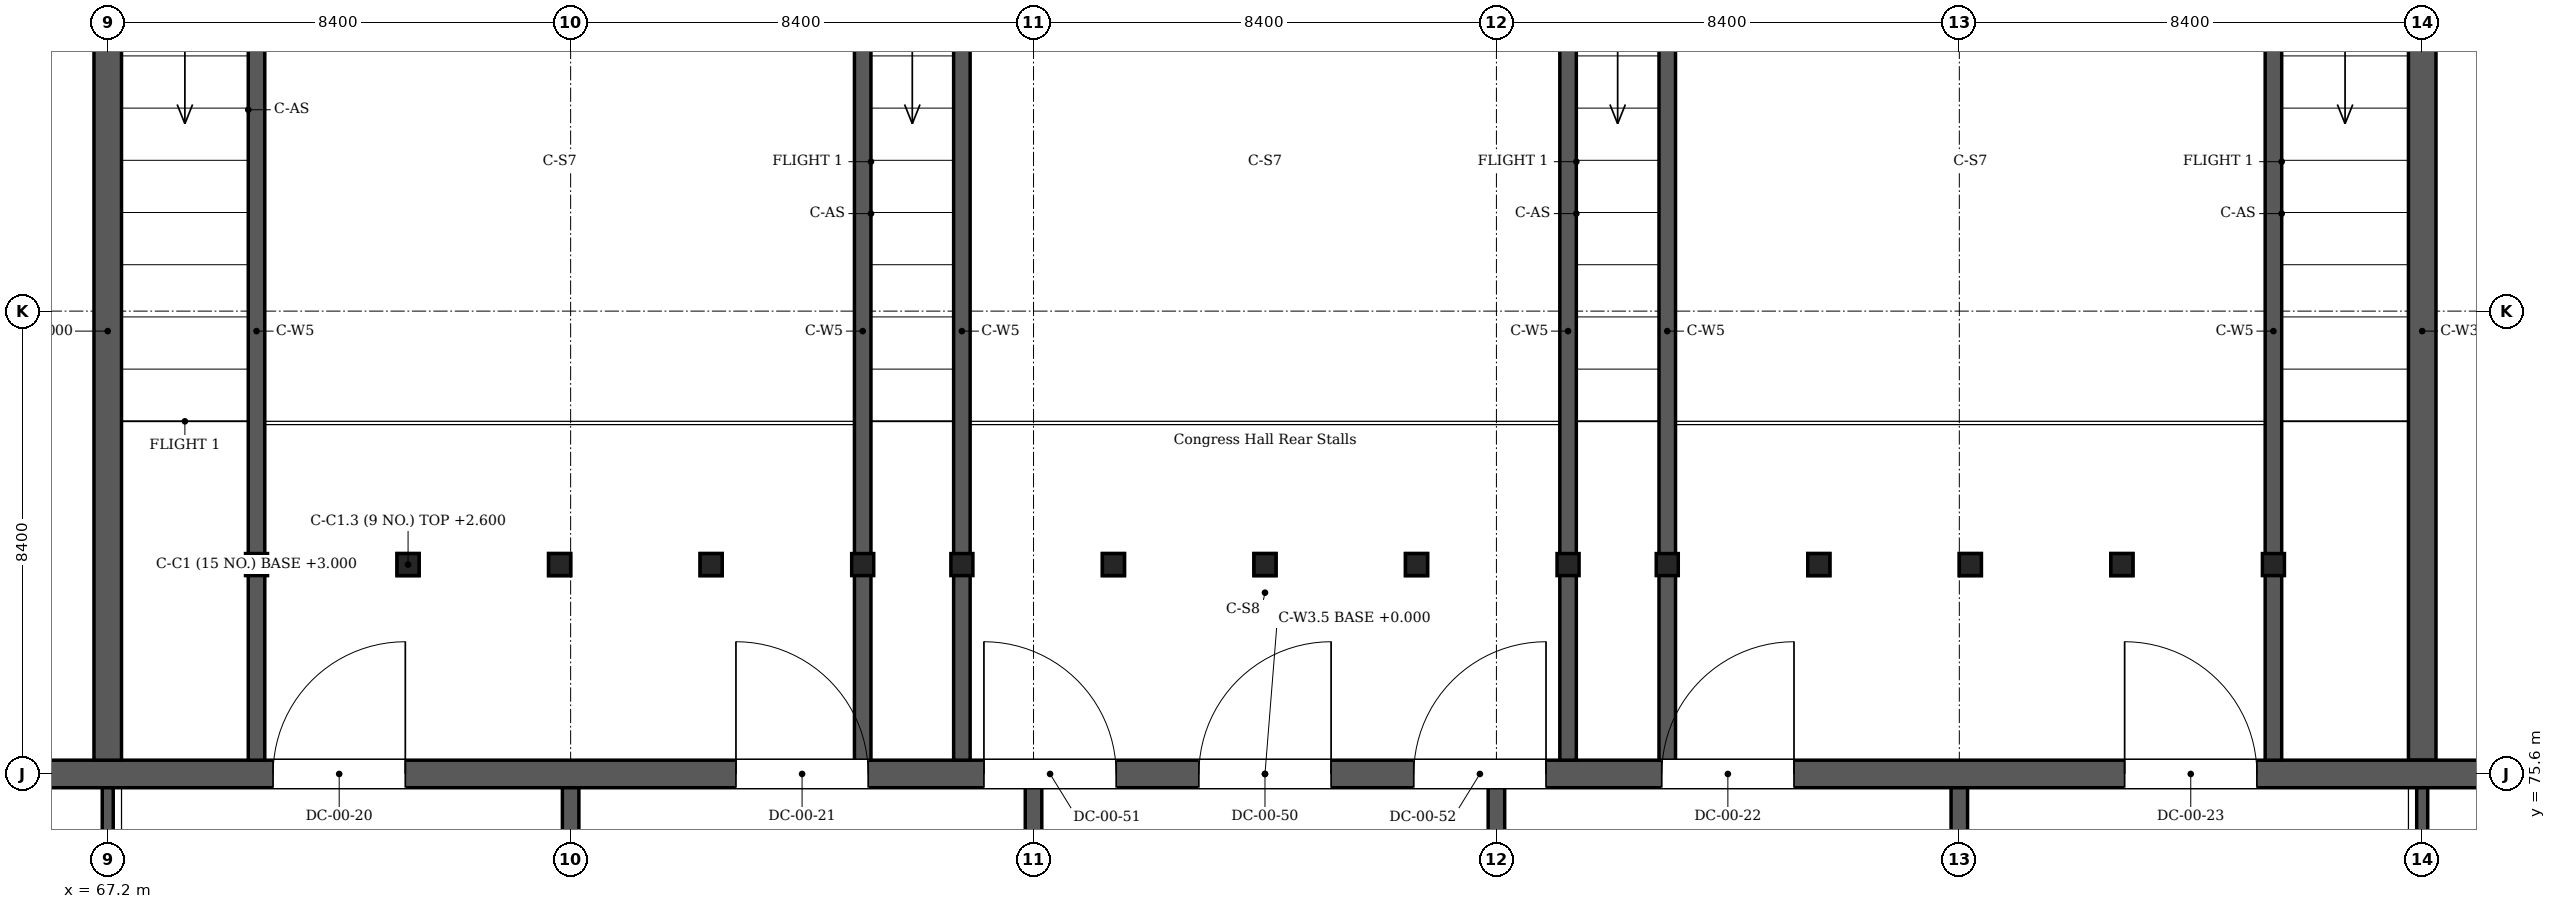
"""IFC4 building model, lengths in metres.
Left out: names, types, materials, properties, quantities, classifications, styles, units other than length and angle.
Written with IfcOpenShell. Run it as: python <this file> out.ifc"""

import sys

from ifc_helpers import new_model, si_unit, direction, frame, frame_2d, origin, origin_2d, place, context, subcontext, project, spatial, polyline, rectangle, i_section, outline, extrude, element, fill, save


model = new_model("IFC4")
c1 = context("Model", 3, precision=1e-05, world=origin(), true_north=direction((0.0, 1.0)))
c2 = subcontext(c1, "Body", "Model", "MODEL_VIEW")
j1 = project(units=[si_unit("LENGTHUNIT", "METRE"), si_unit("PLANEANGLEUNIT", "RADIAN")], contexts=[c1])
p1 = place(None, origin())
s1 = spatial("IfcSite", under=j1, at=p1, CompositionType="ELEMENT")
p2 = place(p1, origin())
s2 = spatial("IfcBuilding", under=s1, at=p2, CompositionType="ELEMENT")
p3 = place(p2, origin())
s3 = spatial("IfcBuildingStorey", under=s2, at=p3, CompositionType="ELEMENT", Elevation=0.0)
p4 = place(p3, frame((59.25, 75.6, 0.0), z_axis=(0.0, 0.0, 1.0), x_axis=(1.0, 0.0, 0.0)))
e1 = element("IfcWall", 1, at=p4, inside=s3, PredefinedType="SOLIDWALL", context=c2, shape_type="SweptSolid", body=[
    extrude(rectangle(XDim=57.9, YDim=0.5, at=frame_2d((28.95, 0.0))), origin(), (0.0, 0.0, 1.0), 6.0),
])
p5 = place(p4, frame((1.85, 0.0, 0.0)))
e2 = element("IfcOpeningElement", 2, at=p5, cuts=e1, PredefinedType="OPENING", context=c2, shape_type="SweptSolid", body=[
    extrude(rectangle(XDim=1.8, YDim=2.1, at=frame_2d((0.9, 1.05))), frame((0.0, 0.26, 0.0), z_axis=(0.0, -1.0, 0.0), x_axis=(1.0, 0.0, 0.0)), (0.0, 0.0, 1.0), 0.52),
])
p6 = place(p4, frame((53.25, 0.0, 0.0)))
e3 = element("IfcOpeningElement", 3, at=p6, cuts=e1, PredefinedType="OPENING", context=c2, shape_type="SweptSolid", body=[
    extrude(rectangle(XDim=1.8, YDim=2.1, at=frame_2d((0.9, 1.05))), frame((0.0, 0.26, 0.0), z_axis=(0.0, -1.0, 0.0), x_axis=(1.0, 0.0, 0.0)), (0.0, 0.0, 1.0), 0.52),
])
p7 = place(p4, frame((10.95, 0.0, 3.0)))
e4 = element("IfcOpeningElement", 4, at=p7, cuts=e1, PredefinedType="OPENING", context=c2, shape_type="SweptSolid", body=[
    extrude(rectangle(XDim=2.4, YDim=2.1, at=frame_2d((1.2, 1.05))), frame((0.0, 0.26, 0.0), z_axis=(0.0, -1.0, 0.0), x_axis=(1.0, 0.0, 0.0)), (0.0, 0.0, 1.0), 0.52),
])
p8 = place(p4, frame((19.35, 0.0, 3.0)))
e5 = element("IfcOpeningElement", 5, at=p8, cuts=e1, PredefinedType="OPENING", context=c2, shape_type="SweptSolid", body=[
    extrude(rectangle(XDim=2.4, YDim=2.1, at=frame_2d((1.2, 1.05))), frame((0.0, 0.26, 0.0), z_axis=(0.0, -1.0, 0.0), x_axis=(1.0, 0.0, 0.0)), (0.0, 0.0, 1.0), 0.52),
])
p9 = place(p4, frame((36.15, 0.0, 3.0)))
e6 = element("IfcOpeningElement", 6, at=p9, cuts=e1, PredefinedType="OPENING", context=c2, shape_type="SweptSolid", body=[
    extrude(rectangle(XDim=2.4, YDim=2.1, at=frame_2d((1.2, 1.05))), frame((0.0, 0.26, 0.0), z_axis=(0.0, -1.0, 0.0), x_axis=(1.0, 0.0, 0.0)), (0.0, 0.0, 1.0), 0.52),
])
p10 = place(p4, frame((44.55, 0.0, 3.0)))
e7 = element("IfcOpeningElement", 7, at=p10, cuts=e1, PredefinedType="OPENING", context=c2, shape_type="SweptSolid", body=[
    extrude(rectangle(XDim=2.4, YDim=2.1, at=frame_2d((1.2, 1.05))), frame((0.0, 0.26, 0.0), z_axis=(0.0, -1.0, 0.0), x_axis=(1.0, 0.0, 0.0)), (0.0, 0.0, 1.0), 0.52),
])
p11 = place(p4, frame((27.75, 0.0, 3.0)))
e8 = element("IfcOpeningElement", 8, at=p11, cuts=e1, PredefinedType="OPENING", context=c2, shape_type="SweptSolid", body=[
    extrude(rectangle(XDim=2.4, YDim=2.1, at=frame_2d((1.2, 1.05))), frame((0.0, 0.26, 0.0), z_axis=(0.0, -1.0, 0.0), x_axis=(1.0, 0.0, 0.0)), (0.0, 0.0, 1.0), 0.52),
])
p12 = place(p4, frame((23.85, 0.0, 3.0)))
e9 = element("IfcOpeningElement", 9, at=p12, cuts=e1, PredefinedType="OPENING", context=c2, shape_type="SweptSolid", body=[
    extrude(rectangle(XDim=2.4, YDim=2.1, at=frame_2d((1.2, 1.05))), frame((0.0, 0.26, 0.0), z_axis=(0.0, -1.0, 0.0), x_axis=(1.0, 0.0, 0.0)), (0.0, 0.0, 1.0), 0.52),
])
p13 = place(p4, frame((31.65, 0.0, 3.0)))
e10 = element("IfcOpeningElement", 10, at=p13, cuts=e1, PredefinedType="OPENING", context=c2, shape_type="SweptSolid", body=[
    extrude(rectangle(XDim=2.4, YDim=2.1, at=frame_2d((1.2, 1.05))), frame((0.0, 0.26, 0.0), z_axis=(0.0, -1.0, 0.0), x_axis=(1.0, 0.0, 0.0)), (0.0, 0.0, 1.0), 0.52),
])
p14 = place(p3, frame((67.2, 75.85, 0.0), z_axis=(0.0, 0.0, 1.0), x_axis=(0.0, 1.0, 0.0)))
e11 = element("IfcWall", 11, at=p14, inside=s3, PredefinedType="SOLIDWALL", context=c2, shape_type="SweptSolid", body=[
    extrude(rectangle(XDim=41.5, YDim=0.5, at=frame_2d((20.75, 0.0))), origin(), (0.0, 0.0, 1.0), 6.0),
])
p15 = place(p14, frame((24.55, 0.0, 0.0)))
e12 = element("IfcOpeningElement", 12, at=p15, cuts=e11, PredefinedType="OPENING", context=c2, shape_type="SweptSolid", body=[
    extrude(rectangle(XDim=2.0, YDim=2.4, at=frame_2d((1.0, 1.2))), frame((0.0, 0.26, 0.0), z_axis=(0.0, -1.0, 0.0), x_axis=(1.0, 0.0, 0.0)), (0.0, 0.0, 1.0), 0.52),
])
p16 = place(p3, frame((109.2, 117.35, 0.0), z_axis=(0.0, 0.0, 1.0), x_axis=(0.0, -1.0, 0.0)))
e13 = element("IfcWall", 13, at=p16, inside=s3, PredefinedType="SOLIDWALL", context=c2, shape_type="SweptSolid", body=[
    extrude(rectangle(XDim=41.5, YDim=0.5, at=frame_2d((20.75, 0.0))), origin(), (0.0, 0.0, 1.0), 6.0),
])
p17 = place(p16, frame((14.95, 0.0, 0.0)))
e14 = element("IfcOpeningElement", 14, at=p17, cuts=e13, PredefinedType="OPENING", context=c2, shape_type="SweptSolid", body=[
    extrude(rectangle(XDim=2.0, YDim=2.4, at=frame_2d((1.0, 1.2))), frame((0.0, 0.26, 0.0), z_axis=(0.0, -1.0, 0.0), x_axis=(1.0, 0.0, 0.0)), (0.0, 0.0, 1.0), 0.52),
])
for number, where, z_axis, x_axis in (
    (15, (69.9, 95.767, 0.0), (0.0, 0.0, 1.0), (0.0, -1.0, 0.0)),
    (16, (80.9, 95.767, 0.0), (0.0, 0.0, 1.0), (0.0, -1.0, 0.0)),
    (17, (82.7, 95.767, 0.0), (0.0, 0.0, 1.0), (0.0, -1.0, 0.0)),
    (18, (93.7, 95.767, 0.0), (0.0, 0.0, 1.0), (0.0, -1.0, 0.0)),
    (19, (95.5, 95.767, 0.0), (0.0, 0.0, 1.0), (0.0, -1.0, 0.0)),
    (20, (106.5, 95.767, 0.0), (0.0, 0.0, 1.0), (0.0, -1.0, 0.0)),
):
    element("IfcWall", number, at=place(p3, frame(where, z_axis=z_axis, x_axis=x_axis)), inside=s3, PredefinedType="SOLIDWALL", context=c2, shape_type="SweptSolid", body=[
        extrude(outline(polyline([(0.0, 0.0), (19.917, 0.0), (19.917, 2.6), (13.767, 2.594), (0.0, 0.3), (0.0, 0.0)])), frame((0.0, 0.15, 0.0), z_axis=(0.0, -1.0, 0.0), x_axis=(1.0, 0.0, 0.0)), (0.0, 0.0, 1.0), 0.3),
    ])
for number, where, z_axis, x_axis in (
    (21, (69.9, 79.4, 3.0), (0.0, 0.0, 1.0), (1.0, 0.0, 0.0)),
    (22, (72.65, 79.4, 3.0), (0.0, 0.0, 1.0), (1.0, 0.0, 0.0)),
    (23, (75.4, 79.4, 3.0), (0.0, 0.0, 1.0), (1.0, 0.0, 0.0)),
    (24, (78.15, 79.4, 3.0), (0.0, 0.0, 1.0), (1.0, 0.0, 0.0)),
    (25, (80.9, 79.4, 3.0), (0.0, 0.0, 1.0), (1.0, 0.0, 0.0)),
    (26, (82.7, 79.4, 3.0), (0.0, 0.0, 1.0), (1.0, 0.0, 0.0)),
    (27, (85.45, 79.4, 3.0), (0.0, 0.0, 1.0), (1.0, 0.0, 0.0)),
    (28, (88.2, 79.4, 3.0), (0.0, 0.0, 1.0), (1.0, 0.0, 0.0)),
    (29, (90.95, 79.4, 3.0), (0.0, 0.0, 1.0), (1.0, 0.0, 0.0)),
    (30, (93.7, 79.4, 3.0), (0.0, 0.0, 1.0), (1.0, 0.0, 0.0)),
    (31, (95.5, 79.4, 3.0), (0.0, 0.0, 1.0), (1.0, 0.0, 0.0)),
    (32, (98.25, 79.4, 3.0), (0.0, 0.0, 1.0), (1.0, 0.0, 0.0)),
    (33, (101.0, 79.4, 3.0), (0.0, 0.0, 1.0), (1.0, 0.0, 0.0)),
    (34, (103.75, 79.4, 3.0), (0.0, 0.0, 1.0), (1.0, 0.0, 0.0)),
    (35, (106.5, 79.4, 3.0), (0.0, 0.0, 1.0), (1.0, 0.0, 0.0)),
):
    element("IfcColumn", number, at=place(p3, frame(where, z_axis=z_axis, x_axis=x_axis)), inside=s3, PredefinedType="COLUMN", context=c2, shape_type="SweptSolid", body=[
        extrude(i_section(OverallWidth=0.4, OverallDepth=0.4, WebThickness=0.013, FlangeThickness=0.021, FilletRadius=0.022, at=origin_2d()), origin(), (0.0, 0.0, 1.0), 3.0),
    ])
for number, where, z_axis, x_axis in (
    (36, (72.65, 79.4, 0.0), (0.0, 0.0, 1.0), (1.0, 0.0, 0.0)),
    (37, (75.4, 79.4, 0.0), (0.0, 0.0, 1.0), (1.0, 0.0, 0.0)),
    (38, (78.15, 79.4, 0.0), (0.0, 0.0, 1.0), (1.0, 0.0, 0.0)),
    (39, (85.45, 79.4, 0.0), (0.0, 0.0, 1.0), (1.0, 0.0, 0.0)),
    (40, (88.2, 79.4, 0.0), (0.0, 0.0, 1.0), (1.0, 0.0, 0.0)),
    (41, (90.95, 79.4, 0.0), (0.0, 0.0, 1.0), (1.0, 0.0, 0.0)),
    (42, (98.25, 79.4, 0.0), (0.0, 0.0, 1.0), (1.0, 0.0, 0.0)),
    (43, (101.0, 79.4, 0.0), (0.0, 0.0, 1.0), (1.0, 0.0, 0.0)),
    (44, (103.75, 79.4, 0.0), (0.0, 0.0, 1.0), (1.0, 0.0, 0.0)),
):
    element("IfcColumn", number, at=place(p3, frame(where, z_axis=z_axis, x_axis=x_axis)), inside=s3, PredefinedType="COLUMN", context=c2, shape_type="SweptSolid", body=[
        extrude(i_section(OverallWidth=0.4, OverallDepth=0.4, WebThickness=0.013, FlangeThickness=0.021, FilletRadius=0.022, at=origin_2d()), origin(), (0.0, 0.0, 1.0), 2.6),
    ])
for number, where, z_axis, x_axis in (
    (45, (75.6, 70.75, 0.0), (0.0, 0.0, 1.0), (0.0, 1.0, 0.0)),
    (46, (84.0, 70.75, 0.0), (0.0, 0.0, 1.0), (0.0, 1.0, 0.0)),
    (47, (92.4, 70.75, 0.0), (0.0, 0.0, 1.0), (0.0, 1.0, 0.0)),
    (48, (100.8, 70.75, 0.0), (0.0, 0.0, 1.0), (0.0, 1.0, 0.0)),
):
    element("IfcWall", number, at=place(p3, frame(where, z_axis=z_axis, x_axis=x_axis)), inside=s3, PredefinedType="SOLIDWALL", context=c2, shape_type="SweptSolid", body=[
        extrude(rectangle(XDim=4.6, YDim=0.3, at=frame_2d((2.3, 0.0))), origin(), (0.0, 0.0, 1.0), 2.6),
    ])
p18 = place(p3, frame((67.2, 67.45, 0.0), z_axis=(0.0, 0.0, 1.0), x_axis=(0.0, 1.0, 0.0)))
e49 = element("IfcWall", 49, at=p18, inside=s3, PredefinedType="PARTITIONING", context=c2, shape_type="SweptSolid", body=[
    extrude(rectangle(XDim=7.9, YDim=0.2, at=frame_2d((3.95, 0.0))), origin(), (0.0, 0.0, 1.0), 6.0),
])
p19 = place(p18, frame((0.75, 0.0, 0.0)))
e50 = element("IfcOpeningElement", 50, at=p19, cuts=e49, PredefinedType="OPENING", context=c2, shape_type="SweptSolid", body=[
    extrude(rectangle(XDim=1.8, YDim=2.1, at=frame_2d((0.9, 1.05))), frame((0.0, 0.11, 0.0), z_axis=(0.0, -1.0, 0.0), x_axis=(1.0, 0.0, 0.0)), (0.0, 0.0, 1.0), 0.22),
])
p20 = place(p3, frame((109.2, 67.45, 0.0), z_axis=(0.0, 0.0, 1.0), x_axis=(0.0, 1.0, 0.0)))
e51 = element("IfcWall", 51, at=p20, inside=s3, PredefinedType="PARTITIONING", context=c2, shape_type="SweptSolid", body=[
    extrude(rectangle(XDim=7.9, YDim=0.2, at=frame_2d((3.95, 0.0))), origin(), (0.0, 0.0, 1.0), 6.0),
])
p21 = place(p20, frame((0.75, 0.0, 0.0)))
e52 = element("IfcOpeningElement", 52, at=p21, cuts=e51, PredefinedType="OPENING", context=c2, shape_type="SweptSolid", body=[
    extrude(rectangle(XDim=1.8, YDim=2.1, at=frame_2d((0.9, 1.05))), frame((0.0, 0.11, 0.0), z_axis=(0.0, -1.0, 0.0), x_axis=(1.0, 0.0, 0.0)), (0.0, 0.0, 1.0), 0.22),
])
p22 = place(p7, origin())
e53 = element("IfcDoor", 53, at=p22, inside=s3, OperationType="DOUBLE_DOOR_DOUBLE_SWING", PredefinedType="DOOR", context=c2, shape_type="SweptSolid", body=[
    extrude(rectangle(XDim=2.4, YDim=2.1, at=frame_2d((1.2, 1.05))), frame((0.0, 0.025, 0.0), z_axis=(0.0, -1.0, 0.0), x_axis=(1.0, 0.0, 0.0)), (0.0, 0.0, 1.0), 0.05),
])
fill(e4, e53)
p23 = place(p8, origin())
e54 = element("IfcDoor", 54, at=p23, inside=s3, OperationType="DOUBLE_DOOR_DOUBLE_SWING", PredefinedType="DOOR", context=c2, shape_type="SweptSolid", body=[
    extrude(rectangle(XDim=2.4, YDim=2.1, at=frame_2d((1.2, 1.05))), frame((0.0, 0.025, 0.0), z_axis=(0.0, -1.0, 0.0), x_axis=(1.0, 0.0, 0.0)), (0.0, 0.0, 1.0), 0.05),
])
fill(e5, e54)
p24 = place(p9, origin())
e55 = element("IfcDoor", 55, at=p24, inside=s3, OperationType="DOUBLE_DOOR_DOUBLE_SWING", PredefinedType="DOOR", context=c2, shape_type="SweptSolid", body=[
    extrude(rectangle(XDim=2.4, YDim=2.1, at=frame_2d((1.2, 1.05))), frame((0.0, 0.025, 0.0), z_axis=(0.0, -1.0, 0.0), x_axis=(1.0, 0.0, 0.0)), (0.0, 0.0, 1.0), 0.05),
])
fill(e6, e55)
p25 = place(p10, origin())
e56 = element("IfcDoor", 56, at=p25, inside=s3, OperationType="DOUBLE_DOOR_DOUBLE_SWING", PredefinedType="DOOR", context=c2, shape_type="SweptSolid", body=[
    extrude(rectangle(XDim=2.4, YDim=2.1, at=frame_2d((1.2, 1.05))), frame((0.0, 0.025, 0.0), z_axis=(0.0, -1.0, 0.0), x_axis=(1.0, 0.0, 0.0)), (0.0, 0.0, 1.0), 0.05),
])
fill(e7, e56)
p26 = place(p11, origin())
e57 = element("IfcDoor", 57, at=p26, inside=s3, OperationType="DOUBLE_DOOR_DOUBLE_SWING", PredefinedType="DOOR", context=c2, shape_type="SweptSolid", body=[
    extrude(rectangle(XDim=2.4, YDim=2.1, at=frame_2d((1.2, 1.05))), frame((0.0, 0.025, 0.0), z_axis=(0.0, -1.0, 0.0), x_axis=(1.0, 0.0, 0.0)), (0.0, 0.0, 1.0), 0.05),
])
fill(e8, e57)
p27 = place(p12, origin())
e58 = element("IfcDoor", 58, at=p27, inside=s3, OperationType="DOUBLE_DOOR_DOUBLE_SWING", PredefinedType="DOOR", context=c2, shape_type="SweptSolid", body=[
    extrude(rectangle(XDim=2.4, YDim=2.1, at=frame_2d((1.2, 1.05))), frame((0.0, 0.025, 0.0), z_axis=(0.0, -1.0, 0.0), x_axis=(1.0, 0.0, 0.0)), (0.0, 0.0, 1.0), 0.05),
])
fill(e9, e58)
p28 = place(p13, origin())
e59 = element("IfcDoor", 59, at=p28, inside=s3, OperationType="DOUBLE_DOOR_DOUBLE_SWING", PredefinedType="DOOR", context=c2, shape_type="SweptSolid", body=[
    extrude(rectangle(XDim=2.4, YDim=2.1, at=frame_2d((1.2, 1.05))), frame((0.0, 0.025, 0.0), z_axis=(0.0, -1.0, 0.0), x_axis=(1.0, 0.0, 0.0)), (0.0, 0.0, 1.0), 0.05),
])
fill(e10, e59)
save(model, sys.argv[1])
